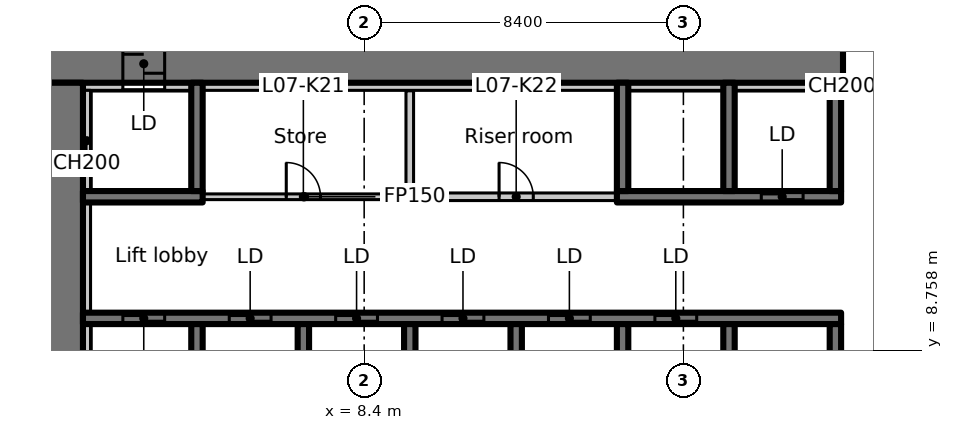
"""IFC4 building model, lengths in metres.
Left out: names, types, materials, properties, quantities, classifications, styles, units other than length and angle.
Written with IfcOpenShell. Run it as: python <this file> out.ifc"""

import sys

from ifc_helpers import new_model, si_unit, direction, frame, frame_2d, origin, place, context, subcontext, project, spatial, rectangle, extrude, element, fill, save


model = new_model("IFC4")
c1 = context("Model", 3, precision=1e-05, world=origin(), true_north=direction((0.0, 1.0)))
c2 = subcontext(c1, "Body", "Model", "MODEL_VIEW")
j1 = project(units=[si_unit("LENGTHUNIT", "METRE"), si_unit("PLANEANGLEUNIT", "RADIAN")], contexts=[c1])
p1 = place(None, origin())
s1 = spatial("IfcSite", under=j1, at=p1, CompositionType="ELEMENT")
p2 = place(p1, origin())
s2 = spatial("IfcBuilding", under=s1, at=p2, CompositionType="ELEMENT")
p3 = place(p2, frame((0.0, 0.0, 40.1)))
s3 = spatial("IfcBuildingStorey", under=s2, at=p3, CompositionType="ELEMENT", Elevation=40.1)
p4 = place(p3, frame((-1.1, 16.3, 0.0), z_axis=(0.0, 0.0, 1.0), x_axis=(1.0, 0.0, 0.0)))
e1 = element("IfcWall", 1, at=p4, inside=s3, PredefinedType="SHEAR", context=c2, shape_type="SweptSolid", body=[
    extrude(rectangle(XDim=22.1, YDim=1.0, at=frame_2d((11.05, 0.0))), origin(), (0.0, 0.0, 1.0), 3.35),
])
p5 = place(p4, frame((3.15, 0.0, 0.0)))
e2 = element("IfcOpeningElement", 2, at=p5, cuts=e1, PredefinedType="OPENING", context=c2, shape_type="SweptSolid", body=[
    extrude(rectangle(XDim=1.1, YDim=2.3, at=frame_2d((0.55, 1.15))), frame((0.0, 0.51, 0.0), z_axis=(0.0, -1.0, 0.0), x_axis=(1.0, 0.0, 0.0)), (0.0, 0.0, 1.0), 1.02),
])
p6 = place(p3, frame((0.5, 6.936, 0.0), z_axis=(0.0, 0.0, 1.0), x_axis=(0.0, 1.0, 0.0)))
e3 = element("IfcWall", 3, at=p6, inside=s3, PredefinedType="SHEAR", context=c2, shape_type="SweptSolid", body=[
    extrude(rectangle(XDim=8.864, YDim=1.0, at=frame_2d((4.432, 0.0))), origin(), (0.0, 0.0, 1.0), 3.35),
])
p7 = place(p3, frame((1.0, 15.7, 0.0), z_axis=(0.0, 0.0, 1.0), x_axis=(1.0, 0.0, 0.0)))
e4 = element("IfcWall", 4, at=p7, inside=s3, PredefinedType="PARTITIONING", context=c2, shape_type="SweptSolid", body=[
    extrude(rectangle(XDim=1.05, YDim=0.2, at=frame_2d((0.525, 0.0))), origin(), (0.0, 0.0, 1.0), 3.35),
])
p8 = place(p3, frame((1.0, 9.6, 0.0), z_axis=(0.0, 0.0, 1.0), x_axis=(1.0, 0.0, 0.0)))
e5 = element("IfcWall", 5, at=p8, inside=s3, PredefinedType="SHEAR", context=c2, shape_type="SweptSolid", body=[
    extrude(rectangle(XDim=19.95, YDim=0.3, at=frame_2d((9.975, 0.0))), origin(), (0.0, 0.0, 1.0), 3.35),
])
p9 = place(p8, frame((1.05, 0.0, 0.0)))
e6 = element("IfcOpeningElement", 6, at=p9, cuts=e5, PredefinedType="OPENING", context=c2, shape_type="SweptSolid", body=[
    extrude(rectangle(XDim=1.1, YDim=2.3, at=frame_2d((0.55, 1.15))), frame((0.0, 0.16, 0.0), z_axis=(0.0, -1.0, 0.0), x_axis=(1.0, 0.0, 0.0)), (0.0, 0.0, 1.0), 0.32),
])
p10 = place(p8, frame((3.85, 0.0, 0.0)))
e7 = element("IfcOpeningElement", 7, at=p10, cuts=e5, PredefinedType="OPENING", context=c2, shape_type="SweptSolid", body=[
    extrude(rectangle(XDim=1.1, YDim=2.3, at=frame_2d((0.55, 1.15))), frame((0.0, 0.16, 0.0), z_axis=(0.0, -1.0, 0.0), x_axis=(1.0, 0.0, 0.0)), (0.0, 0.0, 1.0), 0.32),
])
p11 = place(p8, frame((6.65, 0.0, 0.0)))
e8 = element("IfcOpeningElement", 8, at=p11, cuts=e5, PredefinedType="OPENING", context=c2, shape_type="SweptSolid", body=[
    extrude(rectangle(XDim=1.1, YDim=2.3, at=frame_2d((0.55, 1.15))), frame((0.0, 0.16, 0.0), z_axis=(0.0, -1.0, 0.0), x_axis=(1.0, 0.0, 0.0)), (0.0, 0.0, 1.0), 0.32),
])
p12 = place(p8, frame((9.45, 0.0, 0.0)))
e9 = element("IfcOpeningElement", 9, at=p12, cuts=e5, PredefinedType="OPENING", context=c2, shape_type="SweptSolid", body=[
    extrude(rectangle(XDim=1.1, YDim=2.3, at=frame_2d((0.55, 1.15))), frame((0.0, 0.16, 0.0), z_axis=(0.0, -1.0, 0.0), x_axis=(1.0, 0.0, 0.0)), (0.0, 0.0, 1.0), 0.32),
])
p13 = place(p8, frame((12.25, 0.0, 0.0)))
e10 = element("IfcOpeningElement", 10, at=p13, cuts=e5, PredefinedType="OPENING", context=c2, shape_type="SweptSolid", body=[
    extrude(rectangle(XDim=1.1, YDim=2.3, at=frame_2d((0.55, 1.15))), frame((0.0, 0.16, 0.0), z_axis=(0.0, -1.0, 0.0), x_axis=(1.0, 0.0, 0.0)), (0.0, 0.0, 1.0), 0.32),
])
p14 = place(p8, frame((15.05, 0.0, 0.0)))
e11 = element("IfcOpeningElement", 11, at=p14, cuts=e5, PredefinedType="OPENING", context=c2, shape_type="SweptSolid", body=[
    extrude(rectangle(XDim=1.1, YDim=2.3, at=frame_2d((0.55, 1.15))), frame((0.0, 0.16, 0.0), z_axis=(0.0, -1.0, 0.0), x_axis=(1.0, 0.0, 0.0)), (0.0, 0.0, 1.0), 0.32),
])
for number, where, z_axis, x_axis in (
    (12, (4.0, 7.15, 0.0), (0.0, 0.0, 1.0), (0.0, 1.0, 0.0)),
    (13, (6.8, 7.15, 0.0), (0.0, 0.0, 1.0), (0.0, 1.0, 0.0)),
    (14, (9.6, 7.15, 0.0), (0.0, 0.0, 1.0), (0.0, 1.0, 0.0)),
    (15, (12.4, 7.15, 0.0), (0.0, 0.0, 1.0), (0.0, 1.0, 0.0)),
    (16, (15.2, 7.15, 0.0), (0.0, 0.0, 1.0), (0.0, 1.0, 0.0)),
    (17, (18.0, 7.15, 0.0), (0.0, 0.0, 1.0), (0.0, 1.0, 0.0)),
    (18, (20.8, 7.15, 0.0), (0.0, 0.0, 1.0), (0.0, 1.0, 0.0)),
):
    element("IfcWall", number, at=place(p3, frame(where, z_axis=z_axis, x_axis=x_axis)), inside=s3, PredefinedType="SHEAR", context=c2, shape_type="SweptSolid", body=[
        extrude(rectangle(XDim=2.3, YDim=0.3, at=frame_2d((1.15, 0.0))), origin(), (0.0, 0.0, 1.0), 3.35),
    ])
p15 = place(p3, frame((1.0, 12.8, 0.0), z_axis=(0.0, 0.0, 1.0), x_axis=(1.0, 0.0, 0.0)))
e19 = element("IfcWall", 19, at=p15, inside=s3, PredefinedType="SHEAR", context=c2, shape_type="SweptSolid", body=[
    extrude(rectangle(XDim=3.15, YDim=0.3, at=frame_2d((1.575, 0.0))), origin(), (0.0, 0.0, 1.0), 3.35),
])
p16 = place(p3, frame((4.0, 12.95, 0.0), z_axis=(0.0, 0.0, 1.0), x_axis=(0.0, 1.0, 0.0)))
e20 = element("IfcWall", 20, at=p16, inside=s3, PredefinedType="SHEAR", context=c2, shape_type="SweptSolid", body=[
    extrude(rectangle(XDim=2.85, YDim=0.3, at=frame_2d((1.425, 0.0))), origin(), (0.0, 0.0, 1.0), 3.35),
])
p17 = place(p3, frame((15.05, 12.8, 0.0), z_axis=(0.0, 0.0, 1.0), x_axis=(1.0, 0.0, 0.0)))
e21 = element("IfcWall", 21, at=p17, inside=s3, PredefinedType="SHEAR", context=c2, shape_type="SweptSolid", body=[
    extrude(rectangle(XDim=5.9, YDim=0.3, at=frame_2d((2.95, 0.0))), origin(), (0.0, 0.0, 1.0), 3.35),
])
p18 = place(p17, frame((3.8, 0.0, 0.0)))
e22 = element("IfcOpeningElement", 22, at=p18, cuts=e21, PredefinedType="OPENING", context=c2, shape_type="SweptSolid", body=[
    extrude(rectangle(XDim=1.1, YDim=2.3, at=frame_2d((0.55, 1.15))), frame((0.0, 0.16, 0.0), z_axis=(0.0, -1.0, 0.0), x_axis=(1.0, 0.0, 0.0)), (0.0, 0.0, 1.0), 0.32),
])
for number, where, z_axis, x_axis in (
    (23, (15.2, 12.95, 0.0), (0.0, 0.0, 1.0), (0.0, 1.0, 0.0)),
    (24, (18.0, 12.95, 0.0), (0.0, 0.0, 1.0), (0.0, 1.0, 0.0)),
    (25, (20.8, 12.95, 0.0), (0.0, 0.0, 1.0), (0.0, 1.0, 0.0)),
):
    element("IfcWall", number, at=place(p3, frame(where, z_axis=z_axis, x_axis=x_axis)), inside=s3, PredefinedType="SHEAR", context=c2, shape_type="SweptSolid", body=[
        extrude(rectangle(XDim=2.85, YDim=0.3, at=frame_2d((1.425, 0.0))), origin(), (0.0, 0.0, 1.0), 3.35),
    ])
p19 = place(p3, frame((9.6, 15.588, 0.0), z_axis=(0.0, 0.0, 1.0), x_axis=(0.0, -1.0, 0.0)))
e26 = element("IfcWall", 26, at=p19, inside=s3, PredefinedType="PARTITIONING", context=c2, shape_type="SweptSolid", body=[
    extrude(rectangle(XDim=2.788, YDim=0.2, at=frame_2d((1.394, 0.0))), origin(), (0.0, 0.0, 1.0), 3.35),
])
p20 = place(p3, frame((9.7, 12.8, 0.0), z_axis=(0.0, 0.0, 1.0), x_axis=(1.0, 0.0, 0.0)))
e27 = element("IfcWall", 27, at=p20, inside=s3, PredefinedType="PARTITIONING", context=c2, shape_type="SweptSolid", body=[
    extrude(rectangle(XDim=5.338, YDim=0.2, at=frame_2d((2.669, 0.0))), origin(), (0.0, 0.0, 1.0), 3.35),
])
p21 = place(p20, frame((2.25, 0.0, 0.0)))
e28 = element("IfcOpeningElement", 28, at=p21, cuts=e27, PredefinedType="OPENING", context=c2, shape_type="SweptSolid", body=[
    extrude(rectangle(XDim=0.9, YDim=2.1, at=frame_2d((0.45, 1.05))), frame((0.0, 0.11, 0.0), z_axis=(0.0, -1.0, 0.0), x_axis=(1.0, 0.0, 0.0)), (0.0, 0.0, 1.0), 0.22),
])
p22 = place(p3, frame((4.162, 12.8, 0.0), z_axis=(0.0, 0.0, 1.0), x_axis=(1.0, 0.0, 0.0)))
e29 = element("IfcWall", 29, at=p22, inside=s3, PredefinedType="PARTITIONING", context=c2, shape_type="SweptSolid", body=[
    extrude(rectangle(XDim=5.338, YDim=0.15, at=frame_2d((2.669, 0.0))), origin(), (0.0, 0.0, 1.0), 3.35),
])
p23 = place(p22, frame((2.188, 0.0, 0.0)))
e30 = element("IfcOpeningElement", 30, at=p23, cuts=e29, PredefinedType="OPENING", context=c2, shape_type="SweptSolid", body=[
    extrude(rectangle(XDim=0.9, YDim=2.1, at=frame_2d((0.45, 1.05))), frame((0.0, 0.085, 0.0), z_axis=(0.0, -1.0, 0.0), x_axis=(1.0, 0.0, 0.0)), (0.0, 0.0, 1.0), 0.17),
])
p24 = place(p3, frame((1.1, 7.15, 0.0), z_axis=(0.0, 0.0, 1.0), x_axis=(0.0, 1.0, 0.0)))
e31 = element("IfcWall", 31, at=p24, inside=s3, PredefinedType="PARTITIONING", context=c2, shape_type="SweptSolid", body=[
    extrude(rectangle(XDim=2.3, YDim=0.2, at=frame_2d((1.15, 0.0))), origin(), (0.0, 0.0, 1.0), 3.35),
])
p25 = place(p3, frame((1.1, 9.75, 0.0), z_axis=(0.0, 0.0, 1.0), x_axis=(0.0, 1.0, 0.0)))
e32 = element("IfcWall", 32, at=p25, inside=s3, PredefinedType="PARTITIONING", context=c2, shape_type="SweptSolid", body=[
    extrude(rectangle(XDim=2.9, YDim=0.2, at=frame_2d((1.45, 0.0))), origin(), (0.0, 0.0, 1.0), 3.35),
])
p26 = place(p3, frame((1.1, 12.95, 0.0), z_axis=(0.0, 0.0, 1.0), x_axis=(0.0, 1.0, 0.0)))
e33 = element("IfcWall", 33, at=p26, inside=s3, PredefinedType="PARTITIONING", context=c2, shape_type="SweptSolid", body=[
    extrude(rectangle(XDim=2.65, YDim=0.2, at=frame_2d((1.325, 0.0))), origin(), (0.0, 0.0, 1.0), 3.35),
])
p27 = place(p3, frame((3.15, 15.7, 0.0), z_axis=(0.0, 0.0, 1.0), x_axis=(1.0, 0.0, 0.0)))
e34 = element("IfcWall", 34, at=p27, inside=s3, PredefinedType="PARTITIONING", context=c2, shape_type="SweptSolid", body=[
    extrude(rectangle(XDim=0.7, YDim=0.2, at=frame_2d((0.35, 0.0))), origin(), (0.0, 0.0, 1.0), 3.35),
])
p28 = place(p3, frame((4.15, 15.7, 0.0), z_axis=(0.0, 0.0, 1.0), x_axis=(1.0, 0.0, 0.0)))
e35 = element("IfcWall", 35, at=p28, inside=s3, PredefinedType="PARTITIONING", context=c2, shape_type="SweptSolid", body=[
    extrude(rectangle(XDim=10.9, YDim=0.2, at=frame_2d((5.45, 0.0))), origin(), (0.0, 0.0, 1.0), 3.35),
])
for number, where, z_axis, x_axis in (
    (36, (15.35, 15.7, 0.0), (0.0, 0.0, 1.0), (1.0, 0.0, 0.0)),
    (37, (18.15, 15.7, 0.0), (0.0, 0.0, 1.0), (1.0, 0.0, 0.0)),
):
    element("IfcWall", number, at=place(p3, frame(where, z_axis=z_axis, x_axis=x_axis)), inside=s3, PredefinedType="PARTITIONING", context=c2, shape_type="SweptSolid", body=[
        extrude(rectangle(XDim=2.5, YDim=0.2, at=frame_2d((1.25, 0.0))), origin(), (0.0, 0.0, 1.0), 3.35),
    ])
p29 = place(p3, frame((20.95, 15.7, 0.0), z_axis=(0.0, 0.0, 1.0), x_axis=(1.0, 0.0, 0.0)))
e38 = element("IfcWall", 38, at=p29, inside=s3, PredefinedType="PARTITIONING", context=c2, shape_type="SweptSolid", body=[
    extrude(rectangle(XDim=0.05, YDim=0.2, at=frame_2d((0.025, 0.0))), origin(), (0.0, 0.0, 1.0), 3.35),
])
p30 = place(p9, origin())
e39 = element("IfcDoor", 39, at=p30, inside=s3, OperationType="SLIDING_TO_LEFT", PredefinedType="DOOR", context=c2, shape_type="SweptSolid", body=[
    extrude(rectangle(XDim=1.1, YDim=2.3, at=frame_2d((0.55, 1.15))), frame((0.0, 0.025, 0.0), z_axis=(0.0, -1.0, 0.0), x_axis=(1.0, 0.0, 0.0)), (0.0, 0.0, 1.0), 0.05),
])
fill(e6, e39)
p31 = place(p10, origin())
e40 = element("IfcDoor", 40, at=p31, inside=s3, OperationType="SLIDING_TO_LEFT", PredefinedType="DOOR", context=c2, shape_type="SweptSolid", body=[
    extrude(rectangle(XDim=1.1, YDim=2.3, at=frame_2d((0.55, 1.15))), frame((0.0, 0.025, 0.0), z_axis=(0.0, -1.0, 0.0), x_axis=(1.0, 0.0, 0.0)), (0.0, 0.0, 1.0), 0.05),
])
fill(e7, e40)
p32 = place(p11, origin())
e41 = element("IfcDoor", 41, at=p32, inside=s3, OperationType="SLIDING_TO_LEFT", PredefinedType="DOOR", context=c2, shape_type="SweptSolid", body=[
    extrude(rectangle(XDim=1.1, YDim=2.3, at=frame_2d((0.55, 1.15))), frame((0.0, 0.025, 0.0), z_axis=(0.0, -1.0, 0.0), x_axis=(1.0, 0.0, 0.0)), (0.0, 0.0, 1.0), 0.05),
])
fill(e8, e41)
p33 = place(p12, origin())
e42 = element("IfcDoor", 42, at=p33, inside=s3, OperationType="SLIDING_TO_LEFT", PredefinedType="DOOR", context=c2, shape_type="SweptSolid", body=[
    extrude(rectangle(XDim=1.1, YDim=2.3, at=frame_2d((0.55, 1.15))), frame((0.0, 0.025, 0.0), z_axis=(0.0, -1.0, 0.0), x_axis=(1.0, 0.0, 0.0)), (0.0, 0.0, 1.0), 0.05),
])
fill(e9, e42)
p34 = place(p13, origin())
e43 = element("IfcDoor", 43, at=p34, inside=s3, OperationType="SLIDING_TO_LEFT", PredefinedType="DOOR", context=c2, shape_type="SweptSolid", body=[
    extrude(rectangle(XDim=1.1, YDim=2.3, at=frame_2d((0.55, 1.15))), frame((0.0, 0.025, 0.0), z_axis=(0.0, -1.0, 0.0), x_axis=(1.0, 0.0, 0.0)), (0.0, 0.0, 1.0), 0.05),
])
fill(e10, e43)
p35 = place(p14, origin())
e44 = element("IfcDoor", 44, at=p35, inside=s3, OperationType="SLIDING_TO_LEFT", PredefinedType="DOOR", context=c2, shape_type="SweptSolid", body=[
    extrude(rectangle(XDim=1.1, YDim=2.3, at=frame_2d((0.55, 1.15))), frame((0.0, 0.025, 0.0), z_axis=(0.0, -1.0, 0.0), x_axis=(1.0, 0.0, 0.0)), (0.0, 0.0, 1.0), 0.05),
])
fill(e11, e44)
p36 = place(p5, origin())
e45 = element("IfcDoor", 45, at=p36, inside=s3, OperationType="SLIDING_TO_LEFT", PredefinedType="DOOR", context=c2, shape_type="SweptSolid", body=[
    extrude(rectangle(XDim=1.1, YDim=2.3, at=frame_2d((0.55, 1.15))), frame((0.0, 0.025, 0.0), z_axis=(0.0, -1.0, 0.0), x_axis=(1.0, 0.0, 0.0)), (0.0, 0.0, 1.0), 0.05),
])
fill(e2, e45)
p37 = place(p18, origin())
e46 = element("IfcDoor", 46, at=p37, inside=s3, OperationType="SLIDING_TO_LEFT", PredefinedType="DOOR", context=c2, shape_type="SweptSolid", body=[
    extrude(rectangle(XDim=1.1, YDim=2.3, at=frame_2d((0.55, 1.15))), frame((0.0, 0.025, 0.0), z_axis=(0.0, -1.0, 0.0), x_axis=(1.0, 0.0, 0.0)), (0.0, 0.0, 1.0), 0.05),
])
fill(e22, e46)
p38 = place(p23, origin())
e47 = element("IfcDoor", 47, at=p38, inside=s3, OperationType="SINGLE_SWING_LEFT", PredefinedType="DOOR", context=c2, shape_type="SweptSolid", body=[
    extrude(rectangle(XDim=0.9, YDim=2.1, at=frame_2d((0.45, 1.05))), frame((0.0, 0.025, 0.0), z_axis=(0.0, -1.0, 0.0), x_axis=(1.0, 0.0, 0.0)), (0.0, 0.0, 1.0), 0.05),
])
fill(e30, e47)
p39 = place(p21, origin())
e48 = element("IfcDoor", 48, at=p39, inside=s3, OperationType="SINGLE_SWING_RIGHT", PredefinedType="DOOR", context=c2, shape_type="SweptSolid", body=[
    extrude(rectangle(XDim=0.9, YDim=2.1, at=frame_2d((0.45, 1.05))), frame((0.0, 0.025, 0.0), z_axis=(0.0, -1.0, 0.0), x_axis=(1.0, 0.0, 0.0)), (0.0, 0.0, 1.0), 0.05),
])
fill(e28, e48)
save(model, sys.argv[1])
